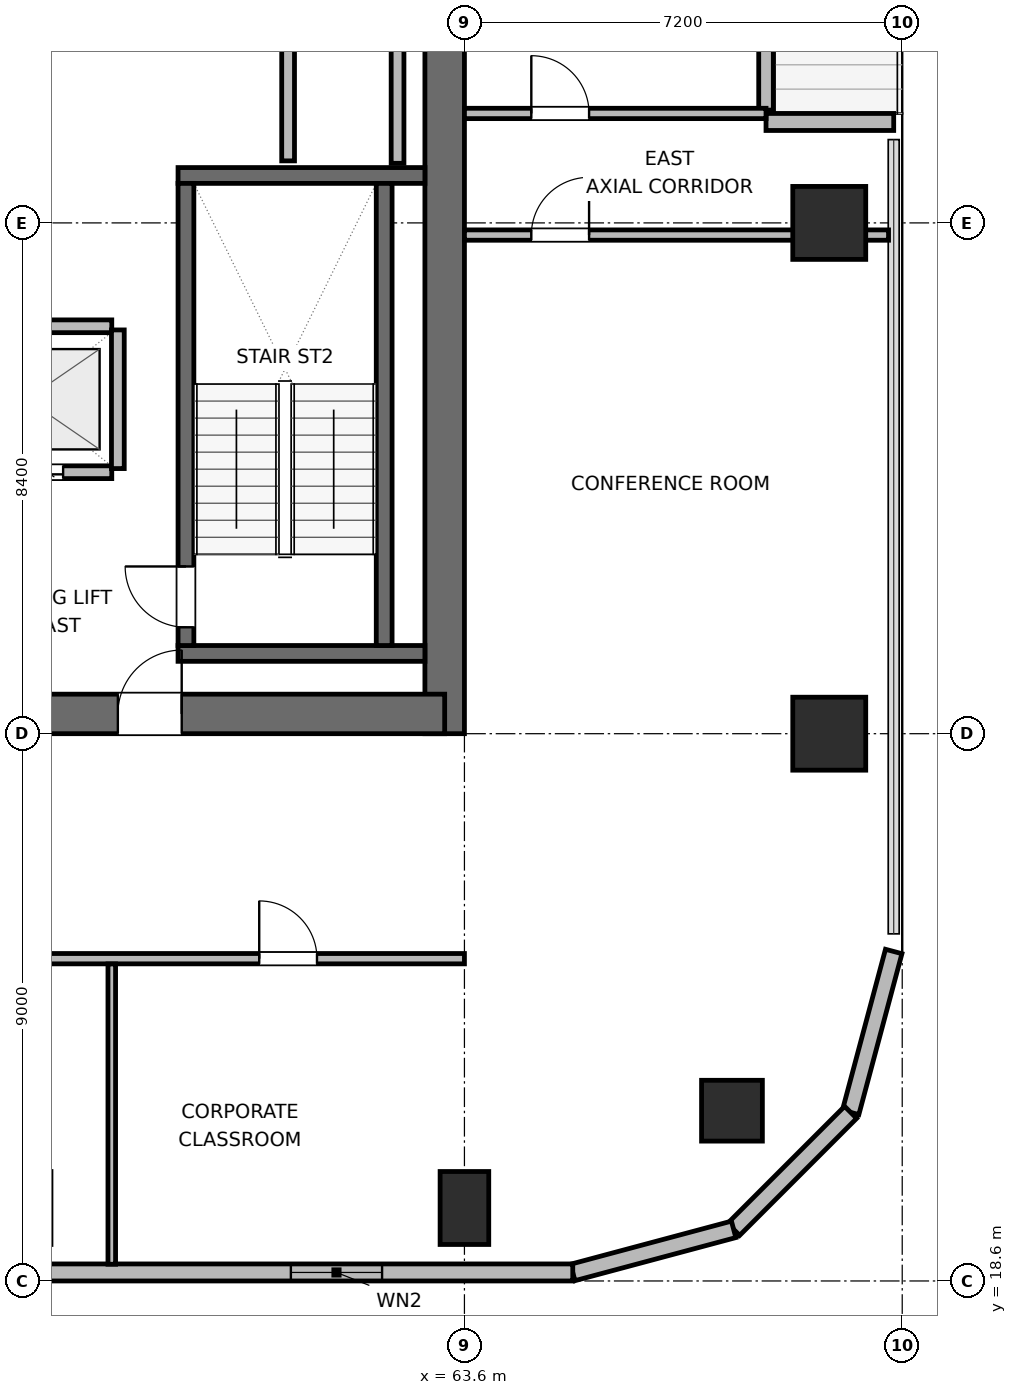
"""IFC4 building model, lengths in metres.
Left out: names, types, materials, properties, quantities, classifications, styles, units other than length and angle.
Written with IfcOpenShell. Run it as: python <this file> out.ifc"""

import sys

from ifc_helpers import new_model, si_unit, direction, frame, frame_2d, origin, origin_2d, place, context, subcontext, project, spatial, rectangle, circle, extrude, element, fill, save


model = new_model("IFC4")
c1 = context("Model", 3, precision=1e-05, world=origin(), true_north=direction((0.0, 1.0)))
c2 = subcontext(c1, "Body", "Model", "MODEL_VIEW")
j1 = project(units=[si_unit("LENGTHUNIT", "METRE"), si_unit("PLANEANGLEUNIT", "RADIAN")], contexts=[c1])
p1 = place(None, origin())
s1 = spatial("IfcSite", under=j1, at=p1, CompositionType="ELEMENT")
p2 = place(p1, origin())
s2 = spatial("IfcBuilding", under=s1, at=p2, CompositionType="ELEMENT")
p3 = place(p2, frame((0.0, 0.0, 201.9)))
s3 = spatial("IfcBuildingStorey", under=s2, at=p3, CompositionType="ELEMENT", Elevation=201.9)
p4 = place(p3, frame((63.275, 27.6, 0.0), z_axis=(0.0, 0.0, 1.0), x_axis=(0.0, 1.0, 0.0)))
e1 = element("IfcWall", 1, at=p4, inside=s3, PredefinedType="SHEAR", context=c2, shape_type="SweptSolid", body=[
    extrude(rectangle(XDim=16.8, YDim=0.65, at=frame_2d((8.4, 0.0))), origin(), (0.0, 0.0, 1.0), 3.9),
])
p5 = place(p3, frame((53.925, 27.925, 0.0), z_axis=(0.0, 0.0, 1.0), x_axis=(1.0, 0.0, 0.0)))
e2 = element("IfcWall", 2, at=p5, inside=s3, PredefinedType="SHEAR", context=c2, shape_type="SweptSolid", body=[
    extrude(rectangle(XDim=9.35, YDim=0.65, at=frame_2d((4.675, 0.0))), origin(), (0.0, 0.0, 1.0), 3.9),
])
p6 = place(p5, frame((3.975, 0.0, 0.0)))
e3 = element("IfcOpeningElement", 3, at=p6, cuts=e2, PredefinedType="OPENING", context=c2, shape_type="SweptSolid", body=[
    extrude(rectangle(XDim=1.05, YDim=2.04, at=frame_2d((0.525, 1.02))), frame((0.0, 0.335, 0.0), z_axis=(0.0, -1.0, 0.0), x_axis=(1.0, 0.0, 0.0)), (0.0, 0.0, 1.0), 0.67),
])
for number, where, z_axis, x_axis in (
    (4, (58.89, 28.92, 0.0), (0.0, 0.0, 1.0), (1.0, 0.0, 0.0)),
    (5, (58.89, 36.78, 0.0), (0.0, 0.0, 1.0), (1.0, 0.0, 0.0)),
):
    element("IfcWall", number, at=place(p3, frame(where, z_axis=z_axis, x_axis=x_axis)), inside=s3, PredefinedType="SHEAR", context=c2, shape_type="SweptSolid", body=[
        extrude(rectangle(XDim=4.06, YDim=0.26, at=frame_2d((2.03, 0.0))), origin(), (0.0, 0.0, 1.0), 3.9),
    ])
p7 = place(p3, frame((59.02, 29.05, 0.0), z_axis=(0.0, 0.0, 1.0), x_axis=(0.0, 1.0, 0.0)))
e6 = element("IfcWall", 6, at=p7, inside=s3, PredefinedType="SHEAR", context=c2, shape_type="SweptSolid", body=[
    extrude(rectangle(XDim=7.6, YDim=0.26, at=frame_2d((3.8, 0.0))), origin(), (0.0, 0.0, 1.0), 3.9),
])
p8 = place(p7, frame((0.3, 0.0, 0.0)))
e7 = element("IfcOpeningElement", 7, at=p8, cuts=e6, PredefinedType="OPENING", context=c2, shape_type="SweptSolid", body=[
    extrude(rectangle(XDim=1.0, YDim=2.04, at=frame_2d((0.5, 1.02))), frame((0.0, 0.14, 0.0), z_axis=(0.0, -1.0, 0.0), x_axis=(1.0, 0.0, 0.0)), (0.0, 0.0, 1.0), 0.28),
])
p9 = place(p3, frame((62.28, 29.05, 0.0), z_axis=(0.0, 0.0, 1.0), x_axis=(0.0, 1.0, 0.0)))
e8 = element("IfcWall", 8, at=p9, inside=s3, PredefinedType="SHEAR", context=c2, shape_type="SweptSolid", body=[
    extrude(rectangle(XDim=7.6, YDim=0.26, at=frame_2d((3.8, 0.0))), origin(), (0.0, 0.0, 1.0), 3.9),
])
p10 = place(p3, frame((68.0, 21.4, 0.0), z_axis=(0.0, 0.0, 1.0), x_axis=(1.0, 0.0, 0.0)))
e9 = element("IfcColumn", 9, at=p10, inside=s3, PredefinedType="COLUMN", context=c2, shape_type="SweptSolid", body=[
    extrude(circle(Radius=0.5, at=origin_2d()), origin(), (0.0, 0.0, 1.0), 3.9),
])
p11 = place(p3, frame((63.6, 19.8, 0.0), z_axis=(0.0, 0.0, 1.0), x_axis=(1.0, 0.0, 0.0)))
e10 = element("IfcColumn", 10, at=p11, inside=s3, PredefinedType="COLUMN", context=c2, shape_type="SweptSolid", body=[
    extrude(rectangle(XDim=0.8, YDim=1.2, at=origin_2d()), origin(), (0.0, 0.0, 1.0), 3.9),
])
for number, where, z_axis, x_axis in (
    (11, (69.6, 27.6, 0.0), (0.0, 0.0, 1.0), (1.0, 0.0, 0.0)),
    (12, (69.6, 36.0, 0.0), (0.0, 0.0, 1.0), (1.0, 0.0, 0.0)),
):
    element("IfcColumn", number, at=place(p3, frame(where, z_axis=z_axis, x_axis=x_axis)), inside=s3, PredefinedType="COLUMN", context=c2, shape_type="SweptSolid", body=[
        extrude(rectangle(XDim=1.2, YDim=1.2, at=origin_2d()), origin(), (0.0, 0.0, 1.0), 3.9),
    ])
p12 = place(p3, frame((68.56, 42.545, 0.0), z_axis=(0.0, 0.0, 1.0), x_axis=(0.0, -1.0, 0.0)))
e13 = element("IfcWall", 13, at=p12, inside=s3, PredefinedType="SOLIDWALL", context=c2, shape_type="SweptSolid", body=[
    extrude(rectangle(XDim=4.69, YDim=0.24, at=frame_2d((2.345, 0.0))), origin(), (0.0, 0.0, 1.0), 3.248),
])
p13 = place(p12, frame((1.845, 0.0, 0.0)))
e14 = element("IfcOpeningElement", 14, at=p13, cuts=e13, PredefinedType="OPENING", context=c2, shape_type="SweptSolid", body=[
    extrude(rectangle(XDim=1.0, YDim=2.02, at=frame_2d((0.5, 1.01))), frame((0.0, 0.13, 0.0), z_axis=(0.0, -1.0, 0.0), x_axis=(1.0, 0.0, 0.0)), (0.0, 0.0, 1.0), 0.26),
])
p14 = place(p3, frame((68.56, 37.66, 0.0), z_axis=(0.0, 0.0, 1.0), x_axis=(1.0, 0.0, 0.0)))
e15 = element("IfcWall", 15, at=p14, inside=s3, PredefinedType="SOLIDWALL", context=c2, shape_type="SweptSolid", body=[
    extrude(rectangle(XDim=2.1, YDim=0.28, at=frame_2d((1.05, 0.0))), origin(), (0.0, 0.0, 1.0), 3.116),
])
p15 = place(p3, frame((70.66, 24.018, 0.0), z_axis=(0.0, 0.0, 1.0), x_axis=(-0.258672222976, -0.9659651552, 0.0)))
e16 = element("IfcWall", 16, at=p15, inside=s3, PredefinedType="SOLIDWALL", context=c2, shape_type="SweptSolid", body=[
    extrude(rectangle(XDim=2.739, YDim=0.28, at=frame_2d((1.37, 0.0))), origin(), (0.0, 0.0, 1.0), 3.68),
])
p16 = place(p3, frame((69.951, 21.373, 0.0), z_axis=(0.0, 0.0, 1.0), x_axis=(-0.707061915429, -0.707151644098, 0.0)))
e17 = element("IfcWall", 17, at=p16, inside=s3, PredefinedType="SOLIDWALL", context=c2, shape_type="SweptSolid", body=[
    extrude(rectangle(XDim=2.721, YDim=0.28, at=frame_2d((1.36, 0.0))), origin(), (0.0, 0.0, 1.0), 3.68),
])
p17 = place(p3, frame((68.028, 19.448, 0.0), z_axis=(0.0, 0.0, 1.0), x_axis=(-0.965971118627, -0.258649952598, 0.0)))
e18 = element("IfcWall", 18, at=p17, inside=s3, PredefinedType="SOLIDWALL", context=c2, shape_type="SweptSolid", body=[
    extrude(rectangle(XDim=2.739, YDim=0.28, at=frame_2d((1.37, 0.0))), origin(), (0.0, 0.0, 1.0), 3.68),
])
p18 = place(p3, frame((65.382, 18.74, 0.0), z_axis=(0.0, 0.0, 1.0), x_axis=(-1.0, 0.0, 0.0)))
e19 = element("IfcWall", 19, at=p18, inside=s3, PredefinedType="SOLIDWALL", context=c2, shape_type="SweptSolid", body=[
    extrude(rectangle(XDim=10.742, YDim=0.28, at=frame_2d((5.371, 0.0))), origin(), (0.0, 0.0, 1.0), 3.68),
])
p19 = place(p18, frame((3.136, 0.0, 0.85)))
e20 = element("IfcOpeningElement", 20, at=p19, cuts=e19, PredefinedType="OPENING", context=c2, shape_type="SweptSolid", body=[
    extrude(rectangle(XDim=1.5, YDim=1.1, at=frame_2d((0.75, 0.55))), frame((0.0, 0.15, 0.0), z_axis=(0.0, -1.0, 0.0), x_axis=(1.0, 0.0, 0.0)), (0.0, 0.0, 1.0), 0.3),
])
p20 = place(p3, frame((60.7, 37.02, 0.0), z_axis=(0.0, 0.0, 1.0), x_axis=(0.0, 1.0, 0.0)))
e21 = element("IfcWall", 21, at=p20, inside=s3, PredefinedType="PARTITIONING", context=c2, shape_type="SweptSolid", body=[
    extrude(rectangle(XDim=1.96, YDim=0.21, at=frame_2d((0.98, 0.0))), origin(), (0.0, 0.0, 1.0), 3.68),
])
p21 = place(p3, frame((62.5, 36.98, 0.0), z_axis=(0.0, 0.0, 1.0), x_axis=(0.0, 1.0, 0.0)))
e22 = element("IfcWall", 22, at=p21, inside=s3, PredefinedType="PARTITIONING", context=c2, shape_type="SweptSolid", body=[
    extrude(rectangle(XDim=2.04, YDim=0.21, at=frame_2d((1.02, 0.0))), origin(), (0.0, 0.0, 1.0), 3.68),
])
p22 = place(p3, frame((55.0, 31.9, 0.0), z_axis=(0.0, 0.0, 1.0), x_axis=(1.0, 0.0, 0.0)))
e23 = element("IfcWall", 23, at=p22, inside=s3, PredefinedType="PARTITIONING", context=c2, shape_type="SweptSolid", body=[
    extrude(rectangle(XDim=2.8, YDim=0.21, at=frame_2d((1.4, 0.0))), origin(), (0.0, 0.0, 1.0), 3.68),
])
p23 = place(p22, frame((0.8, 0.0, 0.0)))
e24 = element("IfcOpeningElement", 24, at=p23, cuts=e23, PredefinedType="OPENING", context=c2, shape_type="SweptSolid", body=[
    extrude(rectangle(XDim=1.2, YDim=2.04, at=frame_2d((0.6, 1.02))), frame((0.0, 0.115, 0.0), z_axis=(0.0, -1.0, 0.0), x_axis=(1.0, 0.0, 0.0)), (0.0, 0.0, 1.0), 0.23),
])
p24 = place(p3, frame((54.32, 34.3, 0.0), z_axis=(0.0, 0.0, 1.0), x_axis=(1.0, 0.0, 0.0)))
e25 = element("IfcWall", 25, at=p24, inside=s3, PredefinedType="PARTITIONING", context=c2, shape_type="SweptSolid", body=[
    extrude(rectangle(XDim=3.48, YDim=0.21, at=frame_2d((1.74, 0.0))), origin(), (0.0, 0.0, 1.0), 3.68),
])
p25 = place(p3, frame((57.9, 31.96, 0.0), z_axis=(0.0, 0.0, 1.0), x_axis=(0.0, 1.0, 0.0)))
e26 = element("IfcWall", 26, at=p25, inside=s3, PredefinedType="PARTITIONING", context=c2, shape_type="SweptSolid", body=[
    extrude(rectangle(XDim=2.28, YDim=0.21, at=frame_2d((1.14, 0.0))), origin(), (0.0, 0.0, 1.0), 3.68),
])
p26 = place(p3, frame((28.975, 23.9, 0.0), z_axis=(0.0, 0.0, 1.0), x_axis=(1.0, 0.0, 0.0)))
e27 = element("IfcWall", 27, at=p26, inside=s3, PredefinedType="PARTITIONING", context=c2, shape_type="SweptSolid", body=[
    extrude(rectangle(XDim=34.625, YDim=0.17, at=frame_2d((17.312, 0.0))), origin(), (0.0, 0.0, 1.0), 3.68),
])
p27 = place(p26, frame((2.427, 0.0, 0.0)))
e28 = element("IfcOpeningElement", 28, at=p27, cuts=e27, PredefinedType="OPENING", context=c2, shape_type="SweptSolid", body=[
    extrude(rectangle(XDim=0.95, YDim=2.04, at=frame_2d((0.475, 1.02))), frame((0.0, 0.095, 0.0), z_axis=(0.0, -1.0, 0.0), x_axis=(1.0, 0.0, 0.0)), (0.0, 0.0, 1.0), 0.19),
])
p28 = place(p26, frame((7.63, 0.0, 0.0)))
e29 = element("IfcOpeningElement", 29, at=p28, cuts=e27, PredefinedType="OPENING", context=c2, shape_type="SweptSolid", body=[
    extrude(rectangle(XDim=0.95, YDim=2.04, at=frame_2d((0.475, 1.02))), frame((0.0, 0.095, 0.0), z_axis=(0.0, -1.0, 0.0), x_axis=(1.0, 0.0, 0.0)), (0.0, 0.0, 1.0), 0.19),
])
p29 = place(p26, frame((14.535, 0.0, 0.0)))
e30 = element("IfcOpeningElement", 30, at=p29, cuts=e27, PredefinedType="OPENING", context=c2, shape_type="SweptSolid", body=[
    extrude(rectangle(XDim=0.95, YDim=2.04, at=frame_2d((0.475, 1.02))), frame((0.0, 0.095, 0.0), z_axis=(0.0, -1.0, 0.0), x_axis=(1.0, 0.0, 0.0)), (0.0, 0.0, 1.0), 0.19),
])
p30 = place(p26, frame((21.44, 0.0, 0.0)))
e31 = element("IfcOpeningElement", 31, at=p30, cuts=e27, PredefinedType="OPENING", context=c2, shape_type="SweptSolid", body=[
    extrude(rectangle(XDim=0.95, YDim=2.04, at=frame_2d((0.475, 1.02))), frame((0.0, 0.095, 0.0), z_axis=(0.0, -1.0, 0.0), x_axis=(1.0, 0.0, 0.0)), (0.0, 0.0, 1.0), 0.19),
])
p31 = place(p26, frame((26.045, 0.0, 0.0)))
e32 = element("IfcOpeningElement", 32, at=p31, cuts=e27, PredefinedType="OPENING", context=c2, shape_type="SweptSolid", body=[
    extrude(rectangle(XDim=0.95, YDim=2.04, at=frame_2d((0.475, 1.02))), frame((0.0, 0.095, 0.0), z_axis=(0.0, -1.0, 0.0), x_axis=(1.0, 0.0, 0.0)), (0.0, 0.0, 1.0), 0.19),
])
p32 = place(p26, frame((31.25, 0.0, 0.0)))
e33 = element("IfcOpeningElement", 33, at=p32, cuts=e27, PredefinedType="OPENING", context=c2, shape_type="SweptSolid", body=[
    extrude(rectangle(XDim=0.95, YDim=2.04, at=frame_2d((0.475, 1.02))), frame((0.0, 0.095, 0.0), z_axis=(0.0, -1.0, 0.0), x_axis=(1.0, 0.0, 0.0)), (0.0, 0.0, 1.0), 0.19),
])
p33 = place(p3, frame((57.8, 18.875, 0.0), z_axis=(0.0, 0.0, 1.0), x_axis=(0.0, 1.0, 0.0)))
e34 = element("IfcWall", 34, at=p33, inside=s3, PredefinedType="PARTITIONING", context=c2, shape_type="SweptSolid", body=[
    extrude(rectangle(XDim=4.938, YDim=0.125, at=frame_2d((2.469, 0.0))), origin(), (0.0, 0.0, 1.0), 3.68),
])
p34 = place(p3, frame((63.6, 35.8, 0.0), z_axis=(0.0, 0.0, 1.0), x_axis=(1.0, 0.0, 0.0)))
e35 = element("IfcWall", 35, at=p34, inside=s3, PredefinedType="PARTITIONING", context=c2, shape_type="SweptSolid", body=[
    extrude(rectangle(XDim=6.975, YDim=0.17, at=frame_2d((3.487, 0.0))), origin(), (0.0, 0.0, 1.0), 3.043),
])
p35 = place(p34, frame((1.1, 0.0, 0.0)))
e36 = element("IfcOpeningElement", 36, at=p35, cuts=e35, PredefinedType="OPENING", context=c2, shape_type="SweptSolid", body=[
    extrude(rectangle(XDim=0.95, YDim=2.04, at=frame_2d((0.475, 1.02))), frame((0.0, 0.095, 0.0), z_axis=(0.0, -1.0, 0.0), x_axis=(1.0, 0.0, 0.0)), (0.0, 0.0, 1.0), 0.19),
])
p36 = place(p3, frame((63.6, 37.8, 0.0), z_axis=(0.0, 0.0, 1.0), x_axis=(1.0, 0.0, 0.0)))
e37 = element("IfcWall", 37, at=p36, inside=s3, PredefinedType="PARTITIONING", context=c2, shape_type="SweptSolid", body=[
    extrude(rectangle(XDim=4.96, YDim=0.17, at=frame_2d((2.48, 0.0))), origin(), (0.0, 0.0, 1.0), 3.68),
])
p37 = place(p36, frame((1.1, 0.0, 0.0)))
e38 = element("IfcOpeningElement", 38, at=p37, cuts=e37, PredefinedType="OPENING", context=c2, shape_type="SweptSolid", body=[
    extrude(rectangle(XDim=0.95, YDim=2.04, at=frame_2d((0.475, 1.02))), frame((0.0, 0.095, 0.0), z_axis=(0.0, -1.0, 0.0), x_axis=(1.0, 0.0, 0.0)), (0.0, 0.0, 1.0), 0.19),
])
p38 = place(p19, origin())
e39 = element("IfcWindow", 39, at=p38, inside=s3, PartitioningType="SINGLE_PANEL", PredefinedType="WINDOW", context=c2, shape_type="SweptSolid", body=[
    extrude(rectangle(XDim=1.5, YDim=1.1, at=frame_2d((0.75, 0.55))), frame((0.0, 0.03, 0.0), z_axis=(0.0, -1.0, 0.0), x_axis=(1.0, 0.0, 0.0)), (0.0, 0.0, 1.0), 0.06),
])
fill(e20, e39)
p39 = place(p8, origin())
e40 = element("IfcDoor", 40, at=p39, inside=s3, OperationType="SINGLE_SWING_RIGHT", PredefinedType="DOOR", context=c2, shape_type="SweptSolid", body=[
    extrude(rectangle(XDim=1.0, YDim=2.04, at=frame_2d((0.5, 1.02))), frame((0.0, 0.025, 0.0), z_axis=(0.0, -1.0, 0.0), x_axis=(1.0, 0.0, 0.0)), (0.0, 0.0, 1.0), 0.05),
])
fill(e7, e40)
p40 = place(p23, origin())
e41 = element("IfcDoor", 41, at=p40, inside=s3, OperationType="DOUBLE_DOOR_SLIDING", PredefinedType="DOOR", context=c2, shape_type="SweptSolid", body=[
    extrude(rectangle(XDim=1.2, YDim=2.04, at=frame_2d((0.6, 1.02))), frame((0.0, 0.025, 0.0), z_axis=(0.0, -1.0, 0.0), x_axis=(1.0, 0.0, 0.0)), (0.0, 0.0, 1.0), 0.05),
])
fill(e24, e41)
p41 = place(p6, origin())
e42 = element("IfcDoor", 42, at=p41, inside=s3, OperationType="SINGLE_SWING_RIGHT", PredefinedType="DOOR", context=c2, shape_type="SweptSolid", body=[
    extrude(rectangle(XDim=1.05, YDim=2.04, at=frame_2d((0.525, 1.02))), frame((0.0, 0.025, 0.0), z_axis=(0.0, -1.0, 0.0), x_axis=(1.0, 0.0, 0.0)), (0.0, 0.0, 1.0), 0.05),
])
fill(e3, e42)
p42 = place(p32, origin())
e43 = element("IfcDoor", 43, at=p42, inside=s3, OperationType="SINGLE_SWING_LEFT", PredefinedType="DOOR", context=c2, shape_type="SweptSolid", body=[
    extrude(rectangle(XDim=0.95, YDim=2.04, at=frame_2d((0.475, 1.02))), frame((0.0, 0.025, 0.0), z_axis=(0.0, -1.0, 0.0), x_axis=(1.0, 0.0, 0.0)), (0.0, 0.0, 1.0), 0.05),
])
fill(e33, e43)
p43 = place(p35, origin())
e44 = element("IfcDoor", 44, at=p43, inside=s3, OperationType="SINGLE_SWING_RIGHT", PredefinedType="DOOR", context=c2, shape_type="SweptSolid", body=[
    extrude(rectangle(XDim=0.95, YDim=2.04, at=frame_2d((0.475, 1.02))), frame((0.0, 0.025, 0.0), z_axis=(0.0, -1.0, 0.0), x_axis=(1.0, 0.0, 0.0)), (0.0, 0.0, 1.0), 0.05),
])
fill(e36, e44)
p44 = place(p37, origin())
e45 = element("IfcDoor", 45, at=p44, inside=s3, OperationType="SINGLE_SWING_LEFT", PredefinedType="DOOR", context=c2, shape_type="SweptSolid", body=[
    extrude(rectangle(XDim=0.95, YDim=2.04, at=frame_2d((0.475, 1.02))), frame((0.0, 0.025, 0.0), z_axis=(0.0, -1.0, 0.0), x_axis=(1.0, 0.0, 0.0)), (0.0, 0.0, 1.0), 0.05),
])
fill(e38, e45)
save(model, sys.argv[1])
